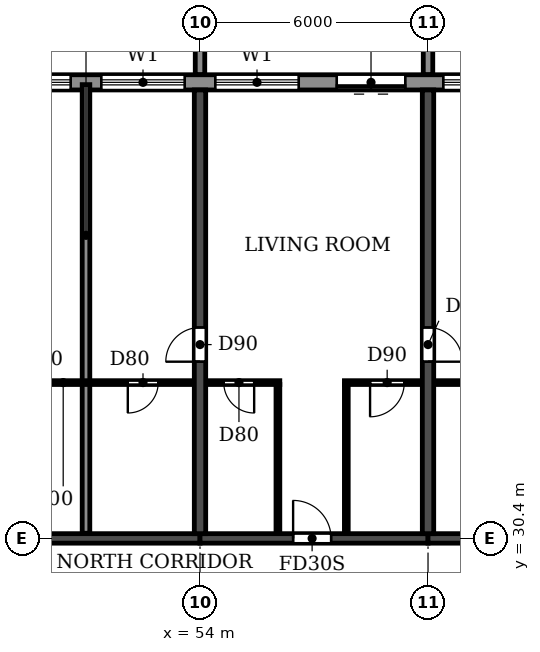
"""IFC4 building model, lengths in metres.
Left out: names, types, materials, properties, quantities, classifications, styles, units other than length and angle.
Written with IfcOpenShell. Run it as: python <this file> out.ifc"""

import sys

from ifc_helpers import new_model, si_unit, direction, frame, frame_2d, origin, place, context, subcontext, project, spatial, polyline, rectangle, outline, extrude, source, transform, mapped, element, fill, save


model = new_model("IFC4")
c1 = context("Model", 3, precision=1e-05, world=origin(), true_north=direction((0.0, 1.0)))
c2 = subcontext(c1, "Body", "Model", "MODEL_VIEW")
j1 = project(units=[si_unit("LENGTHUNIT", "METRE"), si_unit("PLANEANGLEUNIT", "RADIAN")], contexts=[c1])
p1 = place(None, origin())
s1 = spatial("IfcSite", under=j1, at=p1, CompositionType="ELEMENT")
p2 = place(p1, origin())
s2 = spatial("IfcBuilding", under=s1, at=p2, CompositionType="ELEMENT")
p3 = place(p2, frame((0.0, 0.0, 162.0)))
s3 = spatial("IfcBuildingStorey", under=s2, at=p3, CompositionType="ELEMENT", Elevation=162.0)
p4 = place(p3, frame((54.0, 30.525, 0.0), z_axis=(0.0, 0.0, 1.0), x_axis=(0.0, 1.0, 0.0)))
e1 = element("IfcWall", 1, at=p4, inside=s3, PredefinedType="SHEAR", context=c2, shape_type="SweptSolid", body=[
    extrude(rectangle(XDim=11.675, YDim=0.3, at=frame_2d((5.837, 0.0))), origin(), (0.0, 0.0, 1.0), 2.95),
])
p5 = place(p4, frame((4.525, 0.0, 0.0)))
e2 = element("IfcOpeningElement", 2, at=p5, cuts=e1, PredefinedType="OPENING", context=c2, shape_type="SweptSolid", body=[
    extrude(rectangle(XDim=0.9, YDim=2.1, at=frame_2d((0.45, 1.05))), frame((0.0, 0.16, 0.0), z_axis=(0.0, -1.0, 0.0), x_axis=(1.0, 0.0, 0.0)), (0.0, 0.0, 1.0), 0.32),
])
p6 = place(p3, frame((60.0, 30.525, 0.0), z_axis=(0.0, 0.0, 1.0), x_axis=(0.0, 1.0, 0.0)))
e3 = element("IfcWall", 3, at=p6, inside=s3, PredefinedType="SHEAR", context=c2, shape_type="SweptSolid", body=[
    extrude(rectangle(XDim=11.675, YDim=0.3, at=frame_2d((5.837, 0.0))), origin(), (0.0, 0.0, 1.0), 2.95),
])
p7 = place(p6, frame((4.525, 0.0, 0.0)))
e4 = element("IfcOpeningElement", 4, at=p7, cuts=e3, PredefinedType="OPENING", context=c2, shape_type="SweptSolid", body=[
    extrude(rectangle(XDim=0.9, YDim=2.1, at=frame_2d((0.45, 1.05))), frame((0.0, 0.16, 0.0), z_axis=(0.0, -1.0, 0.0), x_axis=(1.0, 0.0, 0.0)), (0.0, 0.0, 1.0), 0.32),
])
p8 = place(p3, frame((48.0, 30.4, 0.0), z_axis=(0.0, 0.0, 1.0), x_axis=(1.0, 0.0, 0.0)))
e5 = element("IfcWall", 5, at=p8, inside=s3, PredefinedType="SHEAR", context=c2, shape_type="SweptSolid", body=[
    extrude(rectangle(XDim=6.0, YDim=0.25, at=frame_2d((3.0, 0.0))), origin(), (0.0, 0.0, 1.0), 2.35),
])
p9 = place(p3, frame((54.0, 30.4, 0.0), z_axis=(0.0, 0.0, 1.0), x_axis=(1.0, 0.0, 0.0)))
e6 = element("IfcWall", 6, at=p9, inside=s3, PredefinedType="SHEAR", context=c2, shape_type="SweptSolid", body=[
    extrude(rectangle(XDim=6.0, YDim=0.25, at=frame_2d((3.0, 0.0))), origin(), (0.0, 0.0, 1.0), 2.35),
])
p10 = place(p9, frame((2.45, 0.0, 0.0)))
e7 = element("IfcOpeningElement", 7, at=p10, cuts=e6, PredefinedType="OPENING", context=c2, shape_type="SweptSolid", body=[
    extrude(rectangle(XDim=1.0, YDim=2.1, at=frame_2d((0.5, 1.05))), frame((0.0, 0.135, 0.0), z_axis=(0.0, -1.0, 0.0), x_axis=(1.0, 0.0, 0.0)), (0.0, 0.0, 1.0), 0.27),
])
p11 = place(p3, frame((60.0, 30.4, 0.0), z_axis=(0.0, 0.0, 1.0), x_axis=(1.0, 0.0, 0.0)))
e8 = element("IfcWall", 8, at=p11, inside=s3, PredefinedType="SHEAR", context=c2, shape_type="SweptSolid", body=[
    extrude(rectangle(XDim=6.0, YDim=0.25, at=frame_2d((3.0, 0.0))), origin(), (0.0, 0.0, 1.0), 2.35),
])
p12 = place(p3, frame((79.317, 42.4, 0.0), z_axis=(0.0, 0.0, 1.0), x_axis=(-1.0, 0.0, 0.0)))
e9 = element("IfcWall", 9, at=p12, inside=s3, PredefinedType="STANDARD", context=c2, shape_type="SweptSolid", body=[
    extrude(rectangle(XDim=56.634, YDim=0.4, at=frame_2d((28.317, 0.0))), origin(), (0.0, 0.0, 1.0), 2.95),
])
p13 = place(p12, frame((52.717, 0.0, 0.9)))
e10 = element("IfcOpeningElement", 10, at=p13, cuts=e9, PredefinedType="OPENING", context=c2, shape_type="SweptSolid", body=[
    extrude(rectangle(XDim=2.2, YDim=1.5, at=frame_2d((1.1, 0.75))), frame((0.0, 0.21, 0.0), z_axis=(0.0, -1.0, 0.0), x_axis=(1.0, 0.0, 0.0)), (0.0, 0.0, 1.0), 0.42),
])
p14 = place(p12, frame((49.917, 0.0, 0.0)))
e11 = element("IfcOpeningElement", 11, at=p14, cuts=e9, PredefinedType="OPENING", context=c2, shape_type="SweptSolid", body=[
    extrude(rectangle(XDim=1.8, YDim=2.4, at=frame_2d((0.9, 1.2))), frame((0.0, 0.21, 0.0), z_axis=(0.0, -1.0, 0.0), x_axis=(1.0, 0.0, 0.0)), (0.0, 0.0, 1.0), 0.42),
])
p15 = place(p12, frame((46.717, 0.0, 0.9)))
e12 = element("IfcOpeningElement", 12, at=p15, cuts=e9, PredefinedType="OPENING", context=c2, shape_type="SweptSolid", body=[
    extrude(rectangle(XDim=2.2, YDim=1.5, at=frame_2d((1.1, 0.75))), frame((0.0, 0.21, 0.0), z_axis=(0.0, -1.0, 0.0), x_axis=(1.0, 0.0, 0.0)), (0.0, 0.0, 1.0), 0.42),
])
p16 = place(p12, frame((43.917, 0.0, 0.0)))
e13 = element("IfcOpeningElement", 13, at=p16, cuts=e9, PredefinedType="OPENING", context=c2, shape_type="SweptSolid", body=[
    extrude(rectangle(XDim=1.8, YDim=2.4, at=frame_2d((0.9, 1.2))), frame((0.0, 0.21, 0.0), z_axis=(0.0, -1.0, 0.0), x_axis=(1.0, 0.0, 0.0)), (0.0, 0.0, 1.0), 0.42),
])
p17 = place(p12, frame((40.717, 0.0, 0.9)))
e14 = element("IfcOpeningElement", 14, at=p17, cuts=e9, PredefinedType="OPENING", context=c2, shape_type="SweptSolid", body=[
    extrude(rectangle(XDim=2.2, YDim=1.5, at=frame_2d((1.1, 0.75))), frame((0.0, 0.21, 0.0), z_axis=(0.0, -1.0, 0.0), x_axis=(1.0, 0.0, 0.0)), (0.0, 0.0, 1.0), 0.42),
])
p18 = place(p12, frame((37.917, 0.0, 0.0)))
e15 = element("IfcOpeningElement", 15, at=p18, cuts=e9, PredefinedType="OPENING", context=c2, shape_type="SweptSolid", body=[
    extrude(rectangle(XDim=1.8, YDim=2.4, at=frame_2d((0.9, 1.2))), frame((0.0, 0.21, 0.0), z_axis=(0.0, -1.0, 0.0), x_axis=(1.0, 0.0, 0.0)), (0.0, 0.0, 1.0), 0.42),
])
p19 = place(p12, frame((34.717, 0.0, 0.9)))
e16 = element("IfcOpeningElement", 16, at=p19, cuts=e9, PredefinedType="OPENING", context=c2, shape_type="SweptSolid", body=[
    extrude(rectangle(XDim=2.2, YDim=1.5, at=frame_2d((1.1, 0.75))), frame((0.0, 0.21, 0.0), z_axis=(0.0, -1.0, 0.0), x_axis=(1.0, 0.0, 0.0)), (0.0, 0.0, 1.0), 0.42),
])
p20 = place(p12, frame((31.717, 0.0, 0.9)))
e17 = element("IfcOpeningElement", 17, at=p20, cuts=e9, PredefinedType="OPENING", context=c2, shape_type="SweptSolid", body=[
    extrude(rectangle(XDim=2.2, YDim=1.5, at=frame_2d((1.1, 0.75))), frame((0.0, 0.21, 0.0), z_axis=(0.0, -1.0, 0.0), x_axis=(1.0, 0.0, 0.0)), (0.0, 0.0, 1.0), 0.42),
])
p21 = place(p12, frame((28.717, 0.0, 0.9)))
e18 = element("IfcOpeningElement", 18, at=p21, cuts=e9, PredefinedType="OPENING", context=c2, shape_type="SweptSolid", body=[
    extrude(rectangle(XDim=2.2, YDim=1.5, at=frame_2d((1.1, 0.75))), frame((0.0, 0.21, 0.0), z_axis=(0.0, -1.0, 0.0), x_axis=(1.0, 0.0, 0.0)), (0.0, 0.0, 1.0), 0.42),
])
p22 = place(p12, frame((25.717, 0.0, 0.9)))
e19 = element("IfcOpeningElement", 19, at=p22, cuts=e9, PredefinedType="OPENING", context=c2, shape_type="SweptSolid", body=[
    extrude(rectangle(XDim=2.2, YDim=1.5, at=frame_2d((1.1, 0.75))), frame((0.0, 0.21, 0.0), z_axis=(0.0, -1.0, 0.0), x_axis=(1.0, 0.0, 0.0)), (0.0, 0.0, 1.0), 0.42),
])
p23 = place(p12, frame((22.717, 0.0, 0.9)))
e20 = element("IfcOpeningElement", 20, at=p23, cuts=e9, PredefinedType="OPENING", context=c2, shape_type="SweptSolid", body=[
    extrude(rectangle(XDim=2.2, YDim=1.5, at=frame_2d((1.1, 0.75))), frame((0.0, 0.21, 0.0), z_axis=(0.0, -1.0, 0.0), x_axis=(1.0, 0.0, 0.0)), (0.0, 0.0, 1.0), 0.42),
])
p24 = place(p12, frame((19.917, 0.0, 0.0)))
e21 = element("IfcOpeningElement", 21, at=p24, cuts=e9, PredefinedType="OPENING", context=c2, shape_type="SweptSolid", body=[
    extrude(rectangle(XDim=1.8, YDim=2.4, at=frame_2d((0.9, 1.2))), frame((0.0, 0.21, 0.0), z_axis=(0.0, -1.0, 0.0), x_axis=(1.0, 0.0, 0.0)), (0.0, 0.0, 1.0), 0.42),
])
p25 = place(p12, frame((16.717, 0.0, 0.9)))
e22 = element("IfcOpeningElement", 22, at=p25, cuts=e9, PredefinedType="OPENING", context=c2, shape_type="SweptSolid", body=[
    extrude(rectangle(XDim=2.2, YDim=1.5, at=frame_2d((1.1, 0.75))), frame((0.0, 0.21, 0.0), z_axis=(0.0, -1.0, 0.0), x_axis=(1.0, 0.0, 0.0)), (0.0, 0.0, 1.0), 0.42),
])
p26 = place(p12, frame((13.717, 0.0, 0.9)))
e23 = element("IfcOpeningElement", 23, at=p26, cuts=e9, PredefinedType="OPENING", context=c2, shape_type="SweptSolid", body=[
    extrude(rectangle(XDim=2.2, YDim=1.5, at=frame_2d((1.1, 0.75))), frame((0.0, 0.21, 0.0), z_axis=(0.0, -1.0, 0.0), x_axis=(1.0, 0.0, 0.0)), (0.0, 0.0, 1.0), 0.42),
])
p27 = place(p12, frame((10.717, 0.0, 0.9)))
e24 = element("IfcOpeningElement", 24, at=p27, cuts=e9, PredefinedType="OPENING", context=c2, shape_type="SweptSolid", body=[
    extrude(rectangle(XDim=2.2, YDim=1.5, at=frame_2d((1.1, 0.75))), frame((0.0, 0.21, 0.0), z_axis=(0.0, -1.0, 0.0), x_axis=(1.0, 0.0, 0.0)), (0.0, 0.0, 1.0), 0.42),
])
p28 = place(p12, frame((7.917, 0.0, 0.0)))
e25 = element("IfcOpeningElement", 25, at=p28, cuts=e9, PredefinedType="OPENING", context=c2, shape_type="SweptSolid", body=[
    extrude(rectangle(XDim=1.8, YDim=2.4, at=frame_2d((0.9, 1.2))), frame((0.0, 0.21, 0.0), z_axis=(0.0, -1.0, 0.0), x_axis=(1.0, 0.0, 0.0)), (0.0, 0.0, 1.0), 0.42),
])
p29 = place(p12, frame((4.717, 0.0, 0.9)))
e26 = element("IfcOpeningElement", 26, at=p29, cuts=e9, PredefinedType="OPENING", context=c2, shape_type="SweptSolid", body=[
    extrude(rectangle(XDim=2.2, YDim=1.5, at=frame_2d((1.1, 0.75))), frame((0.0, 0.21, 0.0), z_axis=(0.0, -1.0, 0.0), x_axis=(1.0, 0.0, 0.0)), (0.0, 0.0, 1.0), 0.42),
])
p30 = place(p12, frame((1.917, 0.0, 0.0)))
e27 = element("IfcOpeningElement", 27, at=p30, cuts=e9, PredefinedType="OPENING", context=c2, shape_type="SweptSolid", body=[
    extrude(rectangle(XDim=1.8, YDim=2.4, at=frame_2d((0.9, 1.2))), frame((0.0, 0.21, 0.0), z_axis=(0.0, -1.0, 0.0), x_axis=(1.0, 0.0, 0.0)), (0.0, 0.0, 1.0), 0.42),
])
m1 = source(origin(), c2, "Body", "SweptSolid", [
    extrude(outline(polyline([(0.0, 0.0), (0.25, 0.0), (0.25, 3.1), (0.0, 3.1), (0.0, 0.0)])), origin(), (0.0, 0.0, 1.0), 3.1),
])
for number, where in (
    (28, (53.875, 42.6, 0.0)),
    (29, (59.875, 42.6, 0.0)),
):
    element("IfcWall", number, at=place(p3, frame(where)), inside=s3, PredefinedType="STANDARD", context=c2, shape_type="MappedRepresentation", body=[
        mapped(m1, transform((0.0, 0.0, 0.0))),
    ])
p31 = place(p3, frame((51.0, 30.535, 0.0), z_axis=(0.0, 0.0, 1.0), x_axis=(0.0, 1.0, 0.0)))
e30 = element("IfcWall", 30, at=p31, inside=s3, PredefinedType="PARTITIONING", context=c2, shape_type="SweptSolid", body=[
    extrude(rectangle(XDim=11.805, YDim=0.2, at=frame_2d((5.903, 0.0))), origin(), (0.0, 0.0, 1.0), 2.95),
])
p32 = place(p3, frame((48.16, 34.5, 0.0), z_axis=(0.0, 0.0, 1.0), x_axis=(1.0, 0.0, 0.0)))
e31 = element("IfcWall", 31, at=p32, inside=s3, PredefinedType="PARTITIONING", context=c2, shape_type="SweptSolid", body=[
    extrude(rectangle(XDim=5.68, YDim=0.1, at=frame_2d((2.84, 0.0))), origin(), (0.0, 0.0, 1.0), 2.95),
])
p33 = place(p32, frame((0.94, 0.0, 0.0)))
e32 = element("IfcOpeningElement", 32, at=p33, cuts=e31, PredefinedType="OPENING", context=c2, shape_type="SweptSolid", body=[
    extrude(rectangle(XDim=0.8, YDim=2.1, at=frame_2d((0.4, 1.05))), frame((0.0, 0.06, 0.0), z_axis=(0.0, -1.0, 0.0), x_axis=(1.0, 0.0, 0.0)), (0.0, 0.0, 1.0), 0.12),
])
p34 = place(p32, frame((3.94, 0.0, 0.0)))
e33 = element("IfcOpeningElement", 33, at=p34, cuts=e31, PredefinedType="OPENING", context=c2, shape_type="SweptSolid", body=[
    extrude(rectangle(XDim=0.8, YDim=2.1, at=frame_2d((0.4, 1.05))), frame((0.0, 0.06, 0.0), z_axis=(0.0, -1.0, 0.0), x_axis=(1.0, 0.0, 0.0)), (0.0, 0.0, 1.0), 0.12),
])
p35 = place(p3, frame((54.16, 34.5, 0.0), z_axis=(0.0, 0.0, 1.0), x_axis=(1.0, 0.0, 0.0)))
e34 = element("IfcWall", 34, at=p35, inside=s3, PredefinedType="PARTITIONING", context=c2, shape_type="SweptSolid", body=[
    extrude(rectangle(XDim=1.94, YDim=0.1, at=frame_2d((0.97, 0.0))), origin(), (0.0, 0.0, 1.0), 2.95),
])
p36 = place(p35, frame((0.465, 0.0, 0.0)))
e35 = element("IfcOpeningElement", 35, at=p36, cuts=e34, PredefinedType="OPENING", context=c2, shape_type="SweptSolid", body=[
    extrude(rectangle(XDim=0.8, YDim=2.1, at=frame_2d((0.4, 1.05))), frame((0.0, 0.06, 0.0), z_axis=(0.0, -1.0, 0.0), x_axis=(1.0, 0.0, 0.0)), (0.0, 0.0, 1.0), 0.12),
])
p37 = place(p3, frame((57.8, 34.5, 0.0), z_axis=(0.0, 0.0, 1.0), x_axis=(1.0, 0.0, 0.0)))
e36 = element("IfcWall", 36, at=p37, inside=s3, PredefinedType="PARTITIONING", context=c2, shape_type="SweptSolid", body=[
    extrude(rectangle(XDim=2.04, YDim=0.1, at=frame_2d((1.02, 0.0))), origin(), (0.0, 0.0, 1.0), 2.95),
])
p38 = place(p37, frame((0.675, 0.0, 0.0)))
e37 = element("IfcOpeningElement", 37, at=p38, cuts=e36, PredefinedType="OPENING", context=c2, shape_type="SweptSolid", body=[
    extrude(rectangle(XDim=0.9, YDim=2.1, at=frame_2d((0.45, 1.05))), frame((0.0, 0.06, 0.0), z_axis=(0.0, -1.0, 0.0), x_axis=(1.0, 0.0, 0.0)), (0.0, 0.0, 1.0), 0.12),
])
p39 = place(p3, frame((60.16, 34.5, 0.0), z_axis=(0.0, 0.0, 1.0), x_axis=(1.0, 0.0, 0.0)))
e38 = element("IfcWall", 38, at=p39, inside=s3, PredefinedType="PARTITIONING", context=c2, shape_type="SweptSolid", body=[
    extrude(rectangle(XDim=2.74, YDim=0.1, at=frame_2d((1.37, 0.0))), origin(), (0.0, 0.0, 1.0), 2.95),
])
p40 = place(p39, frame((0.94, 0.0, 0.0)))
e39 = element("IfcOpeningElement", 39, at=p40, cuts=e38, PredefinedType="OPENING", context=c2, shape_type="SweptSolid", body=[
    extrude(rectangle(XDim=0.8, YDim=2.1, at=frame_2d((0.4, 1.05))), frame((0.0, 0.06, 0.0), z_axis=(0.0, -1.0, 0.0), x_axis=(1.0, 0.0, 0.0)), (0.0, 0.0, 1.0), 0.12),
])
for number, where, z_axis, x_axis in (
    (40, (56.05, 30.535, 0.0), (0.0, 0.0, 1.0), (0.0, 1.0, 0.0)),
    (41, (57.85, 30.535, 0.0), (0.0, 0.0, 1.0), (0.0, 1.0, 0.0)),
):
    element("IfcWall", number, at=place(p3, frame(where, z_axis=z_axis, x_axis=x_axis)), inside=s3, PredefinedType="PARTITIONING", context=c2, shape_type="SweptSolid", body=[
        extrude(rectangle(XDim=3.915, YDim=0.1, at=frame_2d((1.958, 0.0))), origin(), (0.0, 0.0, 1.0), 2.95),
    ])
p41 = place(p21, origin())
e42 = element("IfcWindow", 42, at=p41, inside=s3, PartitioningType="DOUBLE_PANEL_HORIZONTAL", PredefinedType="WINDOW", context=c2, shape_type="SweptSolid", body=[
    extrude(rectangle(XDim=2.2, YDim=1.5, at=frame_2d((1.1, 0.75))), frame((0.0, 0.03, 0.0), z_axis=(0.0, -1.0, 0.0), x_axis=(1.0, 0.0, 0.0)), (0.0, 0.0, 1.0), 0.06),
])
fill(e18, e42)
p42 = place(p22, origin())
e43 = element("IfcWindow", 43, at=p42, inside=s3, PartitioningType="DOUBLE_PANEL_HORIZONTAL", PredefinedType="WINDOW", context=c2, shape_type="SweptSolid", body=[
    extrude(rectangle(XDim=2.2, YDim=1.5, at=frame_2d((1.1, 0.75))), frame((0.0, 0.03, 0.0), z_axis=(0.0, -1.0, 0.0), x_axis=(1.0, 0.0, 0.0)), (0.0, 0.0, 1.0), 0.06),
])
fill(e19, e43)
p43 = place(p23, origin())
e44 = element("IfcWindow", 44, at=p43, inside=s3, PartitioningType="DOUBLE_PANEL_HORIZONTAL", PredefinedType="WINDOW", context=c2, shape_type="SweptSolid", body=[
    extrude(rectangle(XDim=2.2, YDim=1.5, at=frame_2d((1.1, 0.75))), frame((0.0, 0.03, 0.0), z_axis=(0.0, -1.0, 0.0), x_axis=(1.0, 0.0, 0.0)), (0.0, 0.0, 1.0), 0.06),
])
fill(e20, e44)
p44 = place(p24, origin())
e45 = element("IfcDoor", 45, at=p44, inside=s3, OperationType="DOUBLE_DOOR_SLIDING", PredefinedType="DOOR", context=c2, shape_type="SweptSolid", body=[
    extrude(rectangle(XDim=1.8, YDim=2.4, at=frame_2d((0.9, 1.2))), frame((0.0, 0.025, 0.0), z_axis=(0.0, -1.0, 0.0), x_axis=(1.0, 0.0, 0.0)), (0.0, 0.0, 1.0), 0.05),
])
fill(e21, e45)
p45 = place(p25, origin())
e46 = element("IfcWindow", 46, at=p45, inside=s3, PartitioningType="DOUBLE_PANEL_HORIZONTAL", PredefinedType="WINDOW", context=c2, shape_type="SweptSolid", body=[
    extrude(rectangle(XDim=2.2, YDim=1.5, at=frame_2d((1.1, 0.75))), frame((0.0, 0.03, 0.0), z_axis=(0.0, -1.0, 0.0), x_axis=(1.0, 0.0, 0.0)), (0.0, 0.0, 1.0), 0.06),
])
fill(e22, e46)
p46 = place(p34, frame((0.8, 0.0, 0.0), z_axis=(0.0, 0.0, 1.0), x_axis=(-1.0, 0.0, 0.0)))
e47 = element("IfcDoor", 47, at=p46, inside=s3, OperationType="SINGLE_SWING_RIGHT", PredefinedType="DOOR", context=c2, shape_type="SweptSolid", body=[
    extrude(rectangle(XDim=0.8, YDim=2.1, at=frame_2d((0.4, 1.05))), frame((0.0, 0.025, 0.0), z_axis=(0.0, -1.0, 0.0), x_axis=(1.0, 0.0, 0.0)), (0.0, 0.0, 1.0), 0.05),
])
fill(e33, e47)
p47 = place(p5, origin())
e48 = element("IfcDoor", 48, at=p47, inside=s3, OperationType="SINGLE_SWING_LEFT", PredefinedType="DOOR", context=c2, shape_type="SweptSolid", body=[
    extrude(rectangle(XDim=0.9, YDim=2.1, at=frame_2d((0.45, 1.05))), frame((0.0, 0.025, 0.0), z_axis=(0.0, -1.0, 0.0), x_axis=(1.0, 0.0, 0.0)), (0.0, 0.0, 1.0), 0.05),
])
fill(e2, e48)
p48 = place(p36, frame((0.8, 0.0, 0.0), z_axis=(0.0, 0.0, 1.0), x_axis=(-1.0, 0.0, 0.0)))
e49 = element("IfcDoor", 49, at=p48, inside=s3, OperationType="SINGLE_SWING_LEFT", PredefinedType="DOOR", context=c2, shape_type="SweptSolid", body=[
    extrude(rectangle(XDim=0.8, YDim=2.1, at=frame_2d((0.4, 1.05))), frame((0.0, 0.025, 0.0), z_axis=(0.0, -1.0, 0.0), x_axis=(1.0, 0.0, 0.0)), (0.0, 0.0, 1.0), 0.05),
])
fill(e35, e49)
p49 = place(p10, origin())
e50 = element("IfcDoor", 50, at=p49, inside=s3, OperationType="SINGLE_SWING_LEFT", PredefinedType="DOOR", context=c2, shape_type="SweptSolid", body=[
    extrude(rectangle(XDim=1.0, YDim=2.1, at=frame_2d((0.5, 1.05))), frame((0.0, 0.025, 0.0), z_axis=(0.0, -1.0, 0.0), x_axis=(1.0, 0.0, 0.0)), (0.0, 0.0, 1.0), 0.05),
])
fill(e7, e50)
p50 = place(p38, frame((0.9, 0.0, 0.0), z_axis=(0.0, 0.0, 1.0), x_axis=(-1.0, 0.0, 0.0)))
e51 = element("IfcDoor", 51, at=p50, inside=s3, OperationType="SINGLE_SWING_RIGHT", PredefinedType="DOOR", context=c2, shape_type="SweptSolid", body=[
    extrude(rectangle(XDim=0.9, YDim=2.1, at=frame_2d((0.45, 1.05))), frame((0.0, 0.025, 0.0), z_axis=(0.0, -1.0, 0.0), x_axis=(1.0, 0.0, 0.0)), (0.0, 0.0, 1.0), 0.05),
])
fill(e37, e51)
p51 = place(p7, frame((0.9, 0.0, 0.0), z_axis=(0.0, 0.0, 1.0), x_axis=(-1.0, 0.0, 0.0)))
e52 = element("IfcDoor", 52, at=p51, inside=s3, OperationType="SINGLE_SWING_RIGHT", PredefinedType="DOOR", context=c2, shape_type="SweptSolid", body=[
    extrude(rectangle(XDim=0.9, YDim=2.1, at=frame_2d((0.45, 1.05))), frame((0.0, 0.025, 0.0), z_axis=(0.0, -1.0, 0.0), x_axis=(1.0, 0.0, 0.0)), (0.0, 0.0, 1.0), 0.05),
])
fill(e4, e52)
save(model, sys.argv[1])
